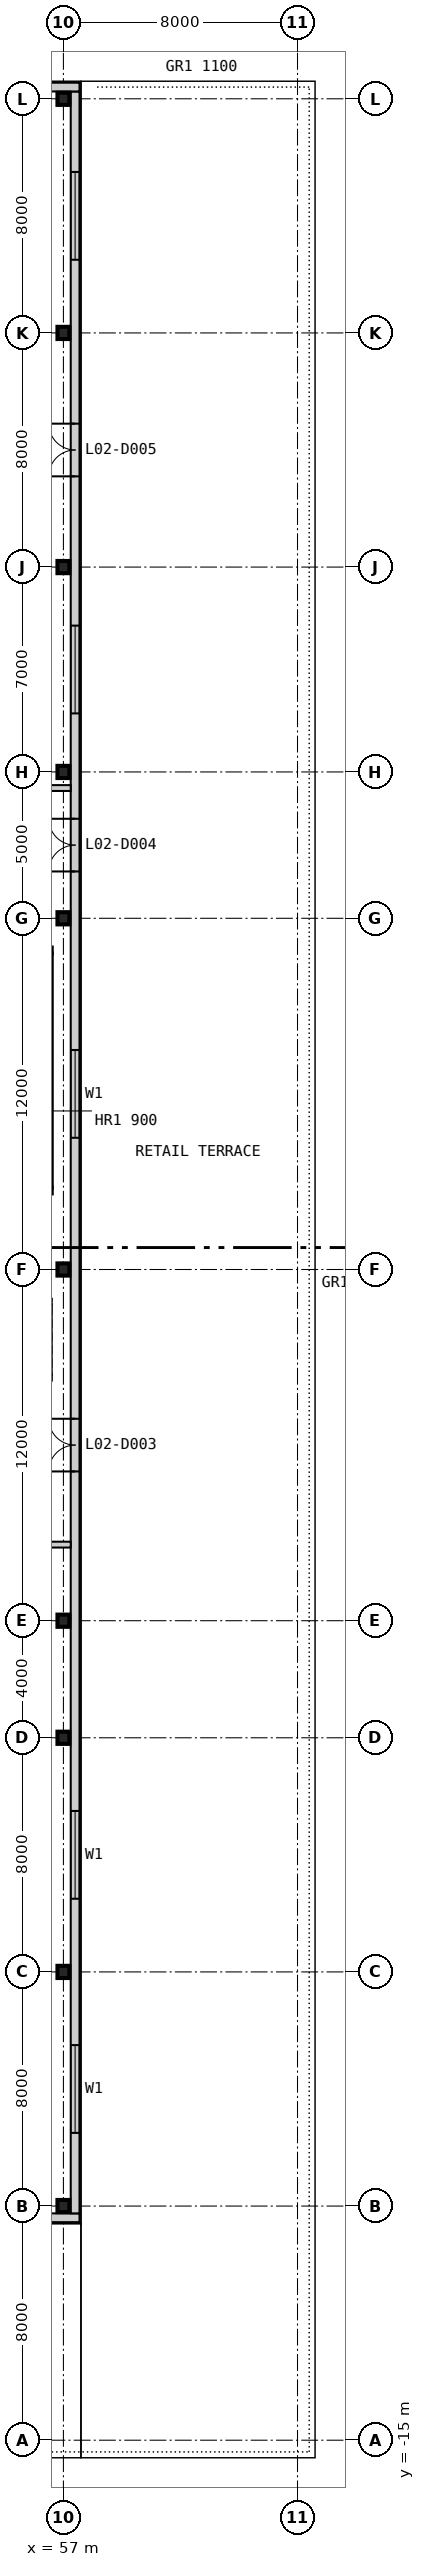
"""IFC4 building model, lengths in metres.
Left out: names, types, materials, properties, quantities, classifications, styles, units other than length and angle.
Written with IfcOpenShell. Run it as: python <this file> out.ifc"""

import sys

from ifc_helpers import new_model, si_unit, direction, frame, frame_2d, origin, origin_2d, place, context, subcontext, project, spatial, rectangle, i_section, extrude, element, fill, save


model = new_model("IFC4")
c1 = context("Model", 3, precision=1e-05, world=origin(), true_north=direction((0.0, 1.0)))
c2 = subcontext(c1, "Body", "Model", "MODEL_VIEW")
j1 = project(units=[si_unit("LENGTHUNIT", "METRE"), si_unit("PLANEANGLEUNIT", "RADIAN")], contexts=[c1])
p1 = place(None, origin())
s1 = spatial("IfcSite", under=j1, at=p1, CompositionType="ELEMENT")
p2 = place(p1, origin())
s2 = spatial("IfcBuilding", under=s1, at=p2, CompositionType="ELEMENT")
p3 = place(p2, frame((0.0, 0.0, 11.8)))
s3 = spatial("IfcBuildingStorey", under=s2, at=p3, CompositionType="ELEMENT", Elevation=11.8)
for number, where, z_axis, x_axis in (
    (1, (57.0, -7.0, 0.0), (0.0, 0.0, 1.0), (1.0, 0.0, 0.0)),
    (2, (57.0, 1.0, 0.0), (0.0, 0.0, 1.0), (1.0, 0.0, 0.0)),
    (3, (57.0, 9.0, 0.0), (0.0, 0.0, 1.0), (1.0, 0.0, 0.0)),
    (4, (57.0, 13.0, 0.0), (0.0, 0.0, 1.0), (1.0, 0.0, 0.0)),
    (5, (57.0, 25.0, 0.0), (0.0, 0.0, 1.0), (1.0, 0.0, 0.0)),
    (6, (57.0, 37.0, 0.0), (0.0, 0.0, 1.0), (1.0, 0.0, 0.0)),
    (7, (57.0, 42.0, 0.0), (0.0, 0.0, 1.0), (1.0, 0.0, 0.0)),
    (8, (57.0, 49.0, 0.0), (0.0, 0.0, 1.0), (1.0, 0.0, 0.0)),
    (9, (57.0, 57.0, 0.0), (0.0, 0.0, 1.0), (1.0, 0.0, 0.0)),
    (10, (57.0, 65.0, 0.0), (0.0, 0.0, 1.0), (1.0, 0.0, 0.0)),
):
    element("IfcColumn", number, at=place(p3, frame(where, z_axis=z_axis, x_axis=x_axis)), inside=s3, PredefinedType="COLUMN", context=c2, shape_type="SweptSolid", body=[
        extrude(i_section(OverallWidth=0.406, OverallDepth=0.417, WebThickness=0.03, FlangeThickness=0.048, at=origin_2d()), origin(), (0.0, 0.0, 1.0), 4.8),
    ])
p4 = place(p3, frame((-15.55, -7.4, 0.0), z_axis=(0.0, 0.0, 1.0), x_axis=(1.0, 0.0, 0.0)))
e11 = element("IfcWall", 11, at=p4, inside=s3, PredefinedType="SOLIDWALL", context=c2, shape_type="SweptSolid", body=[
    extrude(rectangle(XDim=73.1, YDim=0.3, at=frame_2d((36.55, 0.0))), origin(), (0.0, 0.0, 1.0), 4.5),
])
p5 = place(p4, frame((11.65, 0.0, 0.0)))
e12 = element("IfcOpeningElement", 12, at=p5, cuts=e11, PredefinedType="OPENING", context=c2, shape_type="SweptSolid", body=[
    extrude(rectangle(XDim=1.8, YDim=2.4, at=frame_2d((0.9, 1.2))), frame((0.0, 0.16, 0.0), z_axis=(0.0, -1.0, 0.0), x_axis=(1.0, 0.0, 0.0)), (0.0, 0.0, 1.0), 0.32),
])
p6 = place(p4, frame((45.65, 0.0, 0.0)))
e13 = element("IfcOpeningElement", 13, at=p6, cuts=e11, PredefinedType="OPENING", context=c2, shape_type="SweptSolid", body=[
    extrude(rectangle(XDim=1.8, YDim=2.4, at=frame_2d((0.9, 1.2))), frame((0.0, 0.16, 0.0), z_axis=(0.0, -1.0, 0.0), x_axis=(1.0, 0.0, 0.0)), (0.0, 0.0, 1.0), 0.32),
])
p7 = place(p4, frame((3.05, 0.0, 0.9)))
e14 = element("IfcOpeningElement", 14, at=p7, cuts=e11, PredefinedType="OPENING", context=c2, shape_type="SweptSolid", body=[
    extrude(rectangle(XDim=3.0, YDim=2.4, at=frame_2d((1.5, 1.2))), frame((0.0, 0.16, 0.0), z_axis=(0.0, -1.0, 0.0), x_axis=(1.0, 0.0, 0.0)), (0.0, 0.0, 1.0), 0.32),
])
p8 = place(p4, frame((19.05, 0.0, 0.9)))
e15 = element("IfcOpeningElement", 15, at=p8, cuts=e11, PredefinedType="OPENING", context=c2, shape_type="SweptSolid", body=[
    extrude(rectangle(XDim=3.0, YDim=2.4, at=frame_2d((1.5, 1.2))), frame((0.0, 0.16, 0.0), z_axis=(0.0, -1.0, 0.0), x_axis=(1.0, 0.0, 0.0)), (0.0, 0.0, 1.0), 0.32),
])
p9 = place(p4, frame((33.05, 0.0, 0.9)))
e16 = element("IfcOpeningElement", 16, at=p9, cuts=e11, PredefinedType="OPENING", context=c2, shape_type="SweptSolid", body=[
    extrude(rectangle(XDim=3.0, YDim=2.4, at=frame_2d((1.5, 1.2))), frame((0.0, 0.16, 0.0), z_axis=(0.0, -1.0, 0.0), x_axis=(1.0, 0.0, 0.0)), (0.0, 0.0, 1.0), 0.32),
])
p10 = place(p4, frame((53.55, 0.0, 0.9)))
e17 = element("IfcOpeningElement", 17, at=p10, cuts=e11, PredefinedType="OPENING", context=c2, shape_type="SweptSolid", body=[
    extrude(rectangle(XDim=3.0, YDim=2.4, at=frame_2d((1.5, 1.2))), frame((0.0, 0.16, 0.0), z_axis=(0.0, -1.0, 0.0), x_axis=(1.0, 0.0, 0.0)), (0.0, 0.0, 1.0), 0.32),
])
p11 = place(p4, frame((59.55, 0.0, 0.9)))
e18 = element("IfcOpeningElement", 18, at=p11, cuts=e11, PredefinedType="OPENING", context=c2, shape_type="SweptSolid", body=[
    extrude(rectangle(XDim=3.0, YDim=2.4, at=frame_2d((1.5, 1.2))), frame((0.0, 0.16, 0.0), z_axis=(0.0, -1.0, 0.0), x_axis=(1.0, 0.0, 0.0)), (0.0, 0.0, 1.0), 0.32),
])
p12 = place(p4, frame((67.05, 0.0, 0.9)))
e19 = element("IfcOpeningElement", 19, at=p12, cuts=e11, PredefinedType="OPENING", context=c2, shape_type="SweptSolid", body=[
    extrude(rectangle(XDim=3.0, YDim=2.4, at=frame_2d((1.5, 1.2))), frame((0.0, 0.16, 0.0), z_axis=(0.0, -1.0, 0.0), x_axis=(1.0, 0.0, 0.0)), (0.0, 0.0, 1.0), 0.32),
])
p13 = place(p3, frame((57.4, -7.25, 0.0), z_axis=(0.0, 0.0, 1.0), x_axis=(0.0, 1.0, 0.0)))
e20 = element("IfcWall", 20, at=p13, inside=s3, PredefinedType="SOLIDWALL", context=c2, shape_type="SweptSolid", body=[
    extrude(rectangle(XDim=72.5, YDim=0.3, at=frame_2d((36.25, 0.0))), origin(), (0.0, 0.0, 1.0), 4.5),
])
p14 = place(p13, frame((25.35, 0.0, 0.0)))
e21 = element("IfcOpeningElement", 21, at=p14, cuts=e20, PredefinedType="OPENING", context=c2, shape_type="SweptSolid", body=[
    extrude(rectangle(XDim=1.8, YDim=2.4, at=frame_2d((0.9, 1.2))), frame((0.0, 0.16, 0.0), z_axis=(0.0, -1.0, 0.0), x_axis=(1.0, 0.0, 0.0)), (0.0, 0.0, 1.0), 0.32),
])
p15 = place(p13, frame((45.85, 0.0, 0.0)))
e22 = element("IfcOpeningElement", 22, at=p15, cuts=e20, PredefinedType="OPENING", context=c2, shape_type="SweptSolid", body=[
    extrude(rectangle(XDim=1.8, YDim=2.4, at=frame_2d((0.9, 1.2))), frame((0.0, 0.16, 0.0), z_axis=(0.0, -1.0, 0.0), x_axis=(1.0, 0.0, 0.0)), (0.0, 0.0, 1.0), 0.32),
])
p16 = place(p13, frame((59.35, 0.0, 0.0)))
e23 = element("IfcOpeningElement", 23, at=p16, cuts=e20, PredefinedType="OPENING", context=c2, shape_type="SweptSolid", body=[
    extrude(rectangle(XDim=1.8, YDim=2.4, at=frame_2d((0.9, 1.2))), frame((0.0, 0.16, 0.0), z_axis=(0.0, -1.0, 0.0), x_axis=(1.0, 0.0, 0.0)), (0.0, 0.0, 1.0), 0.32),
])
p17 = place(p13, frame((2.75, 0.0, 0.9)))
e24 = element("IfcOpeningElement", 24, at=p17, cuts=e20, PredefinedType="OPENING", context=c2, shape_type="SweptSolid", body=[
    extrude(rectangle(XDim=3.0, YDim=2.4, at=frame_2d((1.5, 1.2))), frame((0.0, 0.16, 0.0), z_axis=(0.0, -1.0, 0.0), x_axis=(1.0, 0.0, 0.0)), (0.0, 0.0, 1.0), 0.32),
])
p18 = place(p13, frame((10.75, 0.0, 0.9)))
e25 = element("IfcOpeningElement", 25, at=p18, cuts=e20, PredefinedType="OPENING", context=c2, shape_type="SweptSolid", body=[
    extrude(rectangle(XDim=3.0, YDim=2.4, at=frame_2d((1.5, 1.2))), frame((0.0, 0.16, 0.0), z_axis=(0.0, -1.0, 0.0), x_axis=(1.0, 0.0, 0.0)), (0.0, 0.0, 1.0), 0.32),
])
p19 = place(p13, frame((36.75, 0.0, 0.9)))
e26 = element("IfcOpeningElement", 26, at=p19, cuts=e20, PredefinedType="OPENING", context=c2, shape_type="SweptSolid", body=[
    extrude(rectangle(XDim=3.0, YDim=2.4, at=frame_2d((1.5, 1.2))), frame((0.0, 0.16, 0.0), z_axis=(0.0, -1.0, 0.0), x_axis=(1.0, 0.0, 0.0)), (0.0, 0.0, 1.0), 0.32),
])
p20 = place(p13, frame((51.25, 0.0, 0.9)))
e27 = element("IfcOpeningElement", 27, at=p20, cuts=e20, PredefinedType="OPENING", context=c2, shape_type="SweptSolid", body=[
    extrude(rectangle(XDim=3.0, YDim=2.4, at=frame_2d((1.5, 1.2))), frame((0.0, 0.16, 0.0), z_axis=(0.0, -1.0, 0.0), x_axis=(1.0, 0.0, 0.0)), (0.0, 0.0, 1.0), 0.32),
])
p21 = place(p13, frame((66.75, 0.0, 0.9)))
e28 = element("IfcOpeningElement", 28, at=p21, cuts=e20, PredefinedType="OPENING", context=c2, shape_type="SweptSolid", body=[
    extrude(rectangle(XDim=3.0, YDim=2.4, at=frame_2d((1.5, 1.2))), frame((0.0, 0.16, 0.0), z_axis=(0.0, -1.0, 0.0), x_axis=(1.0, 0.0, 0.0)), (0.0, 0.0, 1.0), 0.32),
])
p22 = place(p3, frame((57.55, 65.4, 0.0), z_axis=(0.0, 0.0, 1.0), x_axis=(-1.0, 0.0, 0.0)))
e29 = element("IfcWall", 29, at=p22, inside=s3, PredefinedType="SOLIDWALL", context=c2, shape_type="SweptSolid", body=[
    extrude(rectangle(XDim=73.1, YDim=0.3, at=frame_2d((36.55, 0.0))), origin(), (0.0, 0.0, 1.0), 4.5),
])
p23 = place(p22, frame((67.05, 0.0, 0.9)))
e30 = element("IfcOpeningElement", 30, at=p23, cuts=e29, PredefinedType="OPENING", context=c2, shape_type="SweptSolid", body=[
    extrude(rectangle(XDim=3.0, YDim=2.4, at=frame_2d((1.5, 1.2))), frame((0.0, 0.16, 0.0), z_axis=(0.0, -1.0, 0.0), x_axis=(1.0, 0.0, 0.0)), (0.0, 0.0, 1.0), 0.32),
])
p24 = place(p22, frame((59.05, 0.0, 0.9)))
e31 = element("IfcOpeningElement", 31, at=p24, cuts=e29, PredefinedType="OPENING", context=c2, shape_type="SweptSolid", body=[
    extrude(rectangle(XDim=3.0, YDim=2.4, at=frame_2d((1.5, 1.2))), frame((0.0, 0.16, 0.0), z_axis=(0.0, -1.0, 0.0), x_axis=(1.0, 0.0, 0.0)), (0.0, 0.0, 1.0), 0.32),
])
p25 = place(p22, frame((51.05, 0.0, 0.9)))
e32 = element("IfcOpeningElement", 32, at=p25, cuts=e29, PredefinedType="OPENING", context=c2, shape_type="SweptSolid", body=[
    extrude(rectangle(XDim=3.0, YDim=2.4, at=frame_2d((1.5, 1.2))), frame((0.0, 0.16, 0.0), z_axis=(0.0, -1.0, 0.0), x_axis=(1.0, 0.0, 0.0)), (0.0, 0.0, 1.0), 0.32),
])
p26 = place(p22, frame((37.05, 0.0, 0.9)))
e33 = element("IfcOpeningElement", 33, at=p26, cuts=e29, PredefinedType="OPENING", context=c2, shape_type="SweptSolid", body=[
    extrude(rectangle(XDim=3.0, YDim=2.4, at=frame_2d((1.5, 1.2))), frame((0.0, 0.16, 0.0), z_axis=(0.0, -1.0, 0.0), x_axis=(1.0, 0.0, 0.0)), (0.0, 0.0, 1.0), 0.32),
])
p27 = place(p22, frame((25.05, 0.0, 0.9)))
e34 = element("IfcOpeningElement", 34, at=p27, cuts=e29, PredefinedType="OPENING", context=c2, shape_type="SweptSolid", body=[
    extrude(rectangle(XDim=3.0, YDim=2.4, at=frame_2d((1.5, 1.2))), frame((0.0, 0.16, 0.0), z_axis=(0.0, -1.0, 0.0), x_axis=(1.0, 0.0, 0.0)), (0.0, 0.0, 1.0), 0.32),
])
p28 = place(p22, frame((16.55, 0.0, 0.9)))
e35 = element("IfcOpeningElement", 35, at=p28, cuts=e29, PredefinedType="OPENING", context=c2, shape_type="SweptSolid", body=[
    extrude(rectangle(XDim=3.0, YDim=2.4, at=frame_2d((1.5, 1.2))), frame((0.0, 0.16, 0.0), z_axis=(0.0, -1.0, 0.0), x_axis=(1.0, 0.0, 0.0)), (0.0, 0.0, 1.0), 0.32),
])
p29 = place(p22, frame((10.55, 0.0, 0.9)))
e36 = element("IfcOpeningElement", 36, at=p29, cuts=e29, PredefinedType="OPENING", context=c2, shape_type="SweptSolid", body=[
    extrude(rectangle(XDim=3.0, YDim=2.4, at=frame_2d((1.5, 1.2))), frame((0.0, 0.16, 0.0), z_axis=(0.0, -1.0, 0.0), x_axis=(1.0, 0.0, 0.0)), (0.0, 0.0, 1.0), 0.32),
])
p30 = place(p22, frame((3.05, 0.0, 0.9)))
e37 = element("IfcOpeningElement", 37, at=p30, cuts=e29, PredefinedType="OPENING", context=c2, shape_type="SweptSolid", body=[
    extrude(rectangle(XDim=3.0, YDim=2.4, at=frame_2d((1.5, 1.2))), frame((0.0, 0.16, 0.0), z_axis=(0.0, -1.0, 0.0), x_axis=(1.0, 0.0, 0.0)), (0.0, 0.0, 1.0), 0.32),
])
p31 = place(p3, frame((56.6, 23.9, 0.0), z_axis=(0.0, 0.0, 1.0), x_axis=(-1.0, 0.0, 0.0)))
e38 = element("IfcWall", 38, at=p31, inside=s3, PredefinedType="PARTITIONING", context=c2, shape_type="SweptSolid", body=[
    extrude(rectangle(XDim=2.8, YDim=0.2, at=frame_2d((1.4, 0.0))), origin(), (0.0, 0.0, 1.0), 4.5),
])
p32 = place(p3, frame((43.0, 15.6, 0.0), z_axis=(0.0, 0.0, 1.0), x_axis=(1.0, 0.0, 0.0)))
e39 = element("IfcWall", 39, at=p32, inside=s3, PredefinedType="PARTITIONING", context=c2, shape_type="SweptSolid", body=[
    extrude(rectangle(XDim=14.25, YDim=0.2, at=frame_2d((7.125, 0.0))), origin(), (0.0, 0.0, 1.0), 4.5),
])
p33 = place(p32, frame((10.0, 0.0, 0.0)))
e40 = element("IfcOpeningElement", 40, at=p33, cuts=e39, PredefinedType="OPENING", context=c2, shape_type="SweptSolid", body=[
    extrude(rectangle(XDim=1.8, YDim=2.4, at=frame_2d((0.9, 1.2))), frame((0.0, 0.11, 0.0), z_axis=(0.0, -1.0, 0.0), x_axis=(1.0, 0.0, 0.0)), (0.0, 0.0, 1.0), 0.22),
])
p34 = place(p32, frame((2.925, 0.0, 0.0)))
e41 = element("IfcOpeningElement", 41, at=p34, cuts=e39, PredefinedType="OPENING", context=c2, shape_type="SweptSolid", body=[
    extrude(rectangle(XDim=1.8, YDim=2.4, at=frame_2d((0.9, 1.2))), frame((0.0, 0.11, 0.0), z_axis=(0.0, -1.0, 0.0), x_axis=(1.0, 0.0, 0.0)), (0.0, 0.0, 1.0), 0.22),
])
p35 = place(p3, frame((50.6, 41.45, 0.0), z_axis=(0.0, 0.0, 1.0), x_axis=(1.0, 0.0, 0.0)))
e42 = element("IfcWall", 42, at=p35, inside=s3, PredefinedType="PARTITIONING", context=c2, shape_type="SweptSolid", body=[
    extrude(rectangle(XDim=6.65, YDim=0.2, at=frame_2d((3.325, 0.0))), origin(), (0.0, 0.0, 1.0), 4.5),
])
p36 = place(p35, frame((2.425, 0.0, 0.0)))
e43 = element("IfcOpeningElement", 43, at=p36, cuts=e42, PredefinedType="OPENING", context=c2, shape_type="SweptSolid", body=[
    extrude(rectangle(XDim=1.8, YDim=2.4, at=frame_2d((0.9, 1.2))), frame((0.0, 0.11, 0.0), z_axis=(0.0, -1.0, 0.0), x_axis=(1.0, 0.0, 0.0)), (0.0, 0.0, 1.0), 0.22),
])
p37 = place(p14, origin())
e44 = element("IfcDoor", 44, at=p37, inside=s3, OperationType="DOUBLE_DOOR_SINGLE_SWING", PredefinedType="DOOR", context=c2, shape_type="SweptSolid", body=[
    extrude(rectangle(XDim=1.8, YDim=2.4, at=frame_2d((0.9, 1.2))), frame((0.0, 0.025, 0.0), z_axis=(0.0, -1.0, 0.0), x_axis=(1.0, 0.0, 0.0)), (0.0, 0.0, 1.0), 0.05),
])
fill(e21, e44)
p38 = place(p15, origin())
e45 = element("IfcDoor", 45, at=p38, inside=s3, OperationType="DOUBLE_DOOR_SINGLE_SWING", PredefinedType="DOOR", context=c2, shape_type="SweptSolid", body=[
    extrude(rectangle(XDim=1.8, YDim=2.4, at=frame_2d((0.9, 1.2))), frame((0.0, 0.025, 0.0), z_axis=(0.0, -1.0, 0.0), x_axis=(1.0, 0.0, 0.0)), (0.0, 0.0, 1.0), 0.05),
])
fill(e22, e45)
p39 = place(p16, origin())
e46 = element("IfcDoor", 46, at=p39, inside=s3, OperationType="DOUBLE_DOOR_SINGLE_SWING", PredefinedType="DOOR", context=c2, shape_type="SweptSolid", body=[
    extrude(rectangle(XDim=1.8, YDim=2.4, at=frame_2d((0.9, 1.2))), frame((0.0, 0.025, 0.0), z_axis=(0.0, -1.0, 0.0), x_axis=(1.0, 0.0, 0.0)), (0.0, 0.0, 1.0), 0.05),
])
fill(e23, e46)
p40 = place(p17, origin())
e47 = element("IfcWindow", 47, at=p40, inside=s3, PartitioningType="SINGLE_PANEL", PredefinedType="WINDOW", context=c2, shape_type="SweptSolid", body=[
    extrude(rectangle(XDim=3.0, YDim=2.4, at=frame_2d((1.5, 1.2))), frame((0.0, 0.03, 0.0), z_axis=(0.0, -1.0, 0.0), x_axis=(1.0, 0.0, 0.0)), (0.0, 0.0, 1.0), 0.06),
])
fill(e24, e47)
p41 = place(p18, origin())
e48 = element("IfcWindow", 48, at=p41, inside=s3, PartitioningType="SINGLE_PANEL", PredefinedType="WINDOW", context=c2, shape_type="SweptSolid", body=[
    extrude(rectangle(XDim=3.0, YDim=2.4, at=frame_2d((1.5, 1.2))), frame((0.0, 0.03, 0.0), z_axis=(0.0, -1.0, 0.0), x_axis=(1.0, 0.0, 0.0)), (0.0, 0.0, 1.0), 0.06),
])
fill(e25, e48)
p42 = place(p19, origin())
e49 = element("IfcWindow", 49, at=p42, inside=s3, PartitioningType="SINGLE_PANEL", PredefinedType="WINDOW", context=c2, shape_type="SweptSolid", body=[
    extrude(rectangle(XDim=3.0, YDim=2.4, at=frame_2d((1.5, 1.2))), frame((0.0, 0.03, 0.0), z_axis=(0.0, -1.0, 0.0), x_axis=(1.0, 0.0, 0.0)), (0.0, 0.0, 1.0), 0.06),
])
fill(e26, e49)
p43 = place(p20, origin())
e50 = element("IfcWindow", 50, at=p43, inside=s3, PartitioningType="SINGLE_PANEL", PredefinedType="WINDOW", context=c2, shape_type="SweptSolid", body=[
    extrude(rectangle(XDim=3.0, YDim=2.4, at=frame_2d((1.5, 1.2))), frame((0.0, 0.03, 0.0), z_axis=(0.0, -1.0, 0.0), x_axis=(1.0, 0.0, 0.0)), (0.0, 0.0, 1.0), 0.06),
])
fill(e27, e50)
p44 = place(p21, origin())
e51 = element("IfcWindow", 51, at=p44, inside=s3, PartitioningType="SINGLE_PANEL", PredefinedType="WINDOW", context=c2, shape_type="SweptSolid", body=[
    extrude(rectangle(XDim=3.0, YDim=2.4, at=frame_2d((1.5, 1.2))), frame((0.0, 0.03, 0.0), z_axis=(0.0, -1.0, 0.0), x_axis=(1.0, 0.0, 0.0)), (0.0, 0.0, 1.0), 0.06),
])
fill(e28, e51)
save(model, sys.argv[1])
